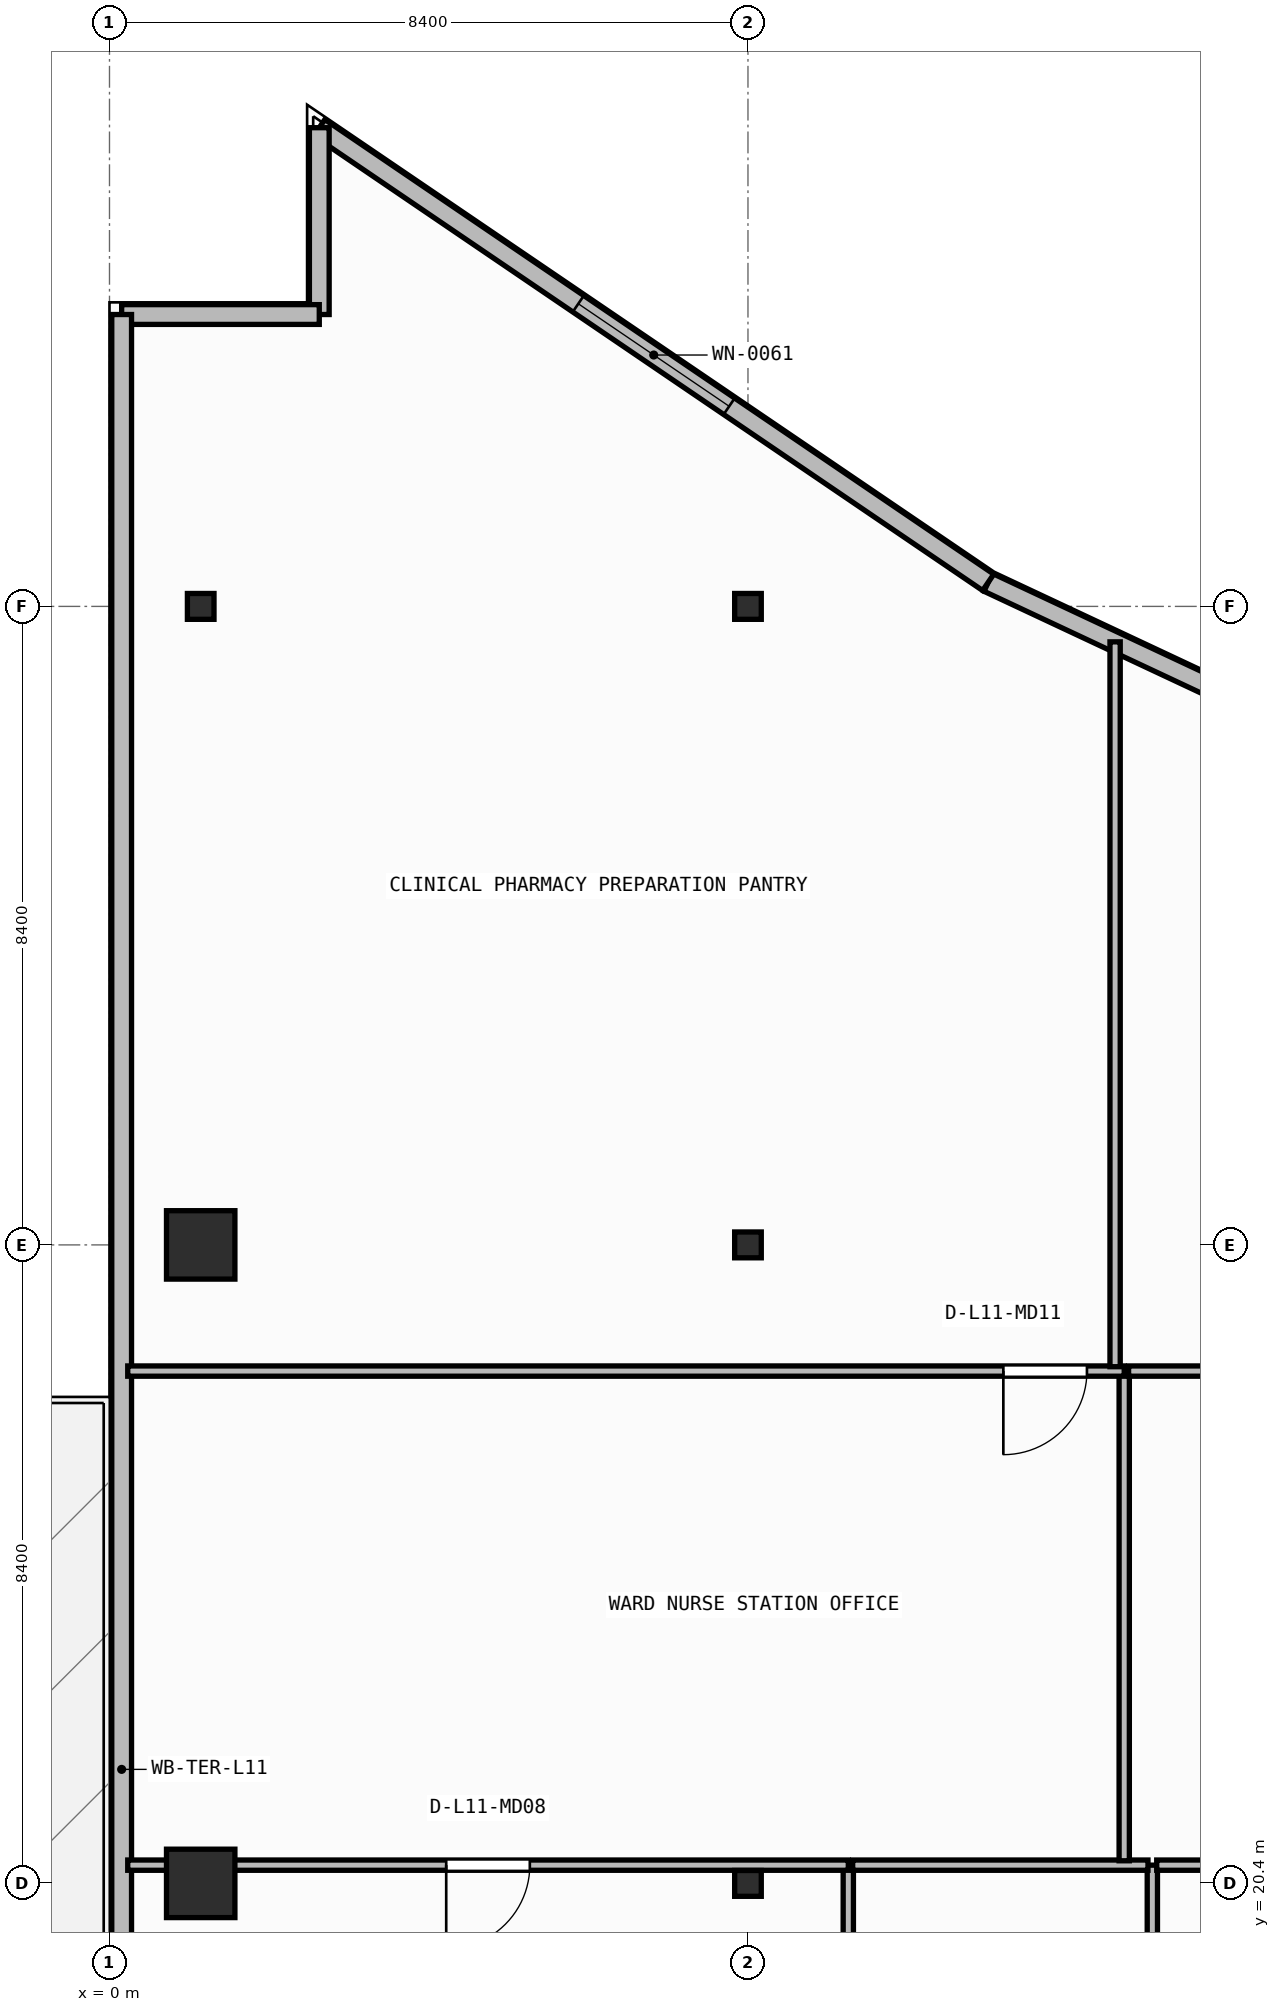
"""IFC4 building model, lengths in metres.
Left out: names, types, materials, properties, quantities, classifications, styles, units other than length and angle.
Written with IfcOpenShell. Run it as: python <this file> out.ifc"""

import sys

from ifc_helpers import new_model, si_unit, direction, frame, frame_2d, origin, origin_2d, place, context, subcontext, project, spatial, rectangle, i_section, extrude, element, fill, save


model = new_model("IFC4")
c1 = context("Model", 3, precision=1e-05, world=origin(), true_north=direction((0.0, 1.0)))
c2 = subcontext(c1, "Body", "Model", "MODEL_VIEW")
j1 = project(units=[si_unit("LENGTHUNIT", "METRE"), si_unit("PLANEANGLEUNIT", "RADIAN")], contexts=[c1])
p1 = place(None, origin())
s1 = spatial("IfcSite", under=j1, at=p1, CompositionType="ELEMENT")
p2 = place(p1, origin())
s2 = spatial("IfcBuilding", under=s1, at=p2, CompositionType="ELEMENT")
p3 = place(p2, frame((0.0, 0.0, 46.2)))
s3 = spatial("IfcBuildingStorey", under=s2, at=p3, CompositionType="ELEMENT", Elevation=46.2)
p4 = place(p3, frame((1.2, 20.4, 0.0), z_axis=(0.0, 0.0, 1.0), x_axis=(1.0, 0.0, 0.0)))
e1 = element("IfcColumn", 1, at=p4, inside=s3, PredefinedType="COLUMN", context=c2, shape_type="SweptSolid", body=[
    extrude(rectangle(XDim=0.9, YDim=0.9, at=origin_2d()), origin(), (0.0, 0.0, 1.0), 3.95),
])
p5 = place(p3, frame((8.4, 20.4, 0.0), z_axis=(0.0, 0.0, 1.0), x_axis=(1.0, 0.0, 0.0)))
e2 = element("IfcColumn", 2, at=p5, inside=s3, PredefinedType="COLUMN", context=c2, shape_type="SweptSolid", body=[
    extrude(i_section(OverallWidth=0.35, OverallDepth=0.34, WebThickness=0.016, FlangeThickness=0.028, at=origin_2d()), origin(), (0.0, 0.0, 1.0), 3.95),
])
p6 = place(p3, frame((1.2, 28.8, 0.0), z_axis=(0.0, 0.0, 1.0), x_axis=(1.0, 0.0, 0.0)))
e3 = element("IfcColumn", 3, at=p6, inside=s3, PredefinedType="COLUMN", context=c2, shape_type="SweptSolid", body=[
    extrude(rectangle(XDim=0.9, YDim=0.9, at=origin_2d()), origin(), (0.0, 0.0, 1.0), 3.95),
])
for number, where, z_axis, x_axis in (
    (4, (8.4, 28.8, 0.0), (0.0, 0.0, 1.0), (1.0, 0.0, 0.0)),
    (5, (1.2, 37.2, 0.0), (0.0, 0.0, 1.0), (1.0, 0.0, 0.0)),
    (6, (8.4, 37.2, 0.0), (0.0, 0.0, 1.0), (1.0, 0.0, 0.0)),
):
    element("IfcColumn", number, at=place(p3, frame(where, z_axis=z_axis, x_axis=x_axis)), inside=s3, PredefinedType="COLUMN", context=c2, shape_type="SweptSolid", body=[
        extrude(i_section(OverallWidth=0.35, OverallDepth=0.34, WebThickness=0.016, FlangeThickness=0.028, at=origin_2d()), origin(), (0.0, 0.0, 1.0), 3.95),
    ])
p7 = place(p3, frame((24.408, 31.492, 0.0), z_axis=(0.0, 0.0, 1.0), x_axis=(-0.905396522918, 0.424566998585, 0.0)))
e7 = element("IfcWall", 7, at=p7, inside=s3, PredefinedType="STANDARD", context=c2, shape_type="SweptSolid", body=[
    extrude(rectangle(XDim=14.189, YDim=0.26, at=frame_2d((7.095, 0.0))), origin(), (0.0, 0.0, 1.0), 3.71),
])
p8 = place(p7, frame((5.895, 0.0, 0.9)))
e8 = element("IfcOpeningElement", 8, at=p8, cuts=e7, PredefinedType="OPENING", context=c2, shape_type="SweptSolid", body=[
    extrude(rectangle(XDim=2.4, YDim=1.65, at=frame_2d((1.2, 0.825))), frame((0.0, 0.14, 0.0), z_axis=(0.0, -1.0, 0.0), x_axis=(1.0, 0.0, 0.0)), (0.0, 0.0, 1.0), 0.28),
])
p9 = place(p3, frame((11.561, 37.517, 0.0), z_axis=(0.0, 0.0, 1.0), x_axis=(-0.827064743936, 0.562106670782, 0.0)))
e9 = element("IfcWall", 9, at=p9, inside=s3, PredefinedType="STANDARD", context=c2, shape_type="SweptSolid", body=[
    extrude(rectangle(XDim=10.641, YDim=0.26, at=frame_2d((5.32, 0.0))), origin(), (0.0, 0.0, 1.0), 3.71),
])
p10 = place(p9, frame((4.12, 0.0, 0.9)))
e10 = element("IfcOpeningElement", 10, at=p10, cuts=e9, PredefinedType="OPENING", context=c2, shape_type="SweptSolid", body=[
    extrude(rectangle(XDim=2.4, YDim=1.65, at=frame_2d((1.2, 0.825))), frame((0.0, 0.14, 0.0), z_axis=(0.0, -1.0, 0.0), x_axis=(1.0, 0.0, 0.0)), (0.0, 0.0, 1.0), 0.28),
])
p11 = place(p3, frame((2.76, 43.498, 0.0), z_axis=(0.0, 0.0, 1.0), x_axis=(0.0, -1.0, 0.0)))
e11 = element("IfcWall", 11, at=p11, inside=s3, PredefinedType="STANDARD", context=c2, shape_type="SweptSolid", body=[
    extrude(rectangle(XDim=2.458, YDim=0.26, at=frame_2d((1.229, 0.0))), origin(), (0.0, 0.0, 1.0), 3.71),
])
p12 = place(p3, frame((2.76, 41.04, 0.0), z_axis=(0.0, 0.0, 1.0), x_axis=(-1.0, 0.0, 0.0)))
e12 = element("IfcWall", 12, at=p12, inside=s3, PredefinedType="STANDARD", context=c2, shape_type="SweptSolid", body=[
    extrude(rectangle(XDim=2.6, YDim=0.26, at=frame_2d((1.3, 0.0))), origin(), (0.0, 0.0, 1.0), 3.71),
])
p13 = place(p3, frame((0.16, 41.04, 0.0), z_axis=(0.0, 0.0, 1.0), x_axis=(0.0, -1.0, 0.0)))
e13 = element("IfcWall", 13, at=p13, inside=s3, PredefinedType="STANDARD", context=c2, shape_type="SweptSolid", body=[
    extrude(rectangle(XDim=38.28, YDim=0.26, at=frame_2d((19.14, 0.0))), origin(), (0.0, 0.0, 1.0), 3.71),
])
p14 = place(p13, frame((22.743, 0.0, 0.0)))
e14 = element("IfcOpeningElement", 14, at=p14, cuts=e13, PredefinedType="OPENING", context=c2, shape_type="SweptSolid", body=[
    extrude(rectangle(XDim=1.3, YDim=2.15, at=frame_2d((0.65, 1.075))), frame((0.0, 0.14, 0.0), z_axis=(0.0, -1.0, 0.0), x_axis=(1.0, 0.0, 0.0)), (0.0, 0.0, 1.0), 0.28),
])
p15 = place(p3, frame((9.72, 14.76, 0.0), z_axis=(0.0, 0.0, 1.0), x_axis=(0.0, 1.0, 0.0)))
e15 = element("IfcWall", 15, at=p15, inside=s3, PredefinedType="PARTITIONING", context=c2, shape_type="SweptSolid", body=[
    extrude(rectangle(XDim=5.88, YDim=0.135, at=frame_2d((2.94, 0.0))), origin(), (0.0, 0.0, 1.0), 3.71),
])
p16 = place(p3, frame((9.72, 20.64, 0.0), z_axis=(0.0, 0.0, 1.0), x_axis=(-1.0, 0.0, 0.0)))
e16 = element("IfcWall", 16, at=p16, inside=s3, PredefinedType="PARTITIONING", context=c2, shape_type="SweptSolid", body=[
    extrude(rectangle(XDim=9.48, YDim=0.135, at=frame_2d((4.74, 0.0))), origin(), (0.0, 0.0, 1.0), 3.073),
])
p17 = place(p16, frame((4.19, 0.0, 0.0)))
e17 = element("IfcOpeningElement", 17, at=p17, cuts=e16, PredefinedType="OPENING", context=c2, shape_type="SweptSolid", body=[
    extrude(rectangle(XDim=1.1, YDim=2.1, at=frame_2d((0.55, 1.05))), frame((0.0, 0.077, 0.0), z_axis=(0.0, -1.0, 0.0), x_axis=(1.0, 0.0, 0.0)), (0.0, 0.0, 1.0), 0.155),
])
p18 = place(p3, frame((13.72, 14.76, 0.0), z_axis=(0.0, 0.0, 1.0), x_axis=(0.0, 1.0, 0.0)))
e18 = element("IfcWall", 18, at=p18, inside=s3, PredefinedType="PARTITIONING", context=c2, shape_type="SweptSolid", body=[
    extrude(rectangle(XDim=5.88, YDim=0.135, at=frame_2d((2.94, 0.0))), origin(), (0.0, 0.0, 1.0), 3.71),
])
p19 = place(p3, frame((13.663, 20.64, 0.0), z_axis=(0.0, 0.0, 1.0), x_axis=(-1.0, 0.0, 0.0)))
e19 = element("IfcWall", 19, at=p19, inside=s3, PredefinedType="PARTITIONING", context=c2, shape_type="SweptSolid", body=[
    extrude(rectangle(XDim=3.885, YDim=0.135, at=frame_2d((1.942, 0.0))), origin(), (0.0, 0.0, 1.0), 3.073),
])
p20 = place(p3, frame((19.84, 20.64, 0.0), z_axis=(0.0, 0.0, 1.0), x_axis=(-1.0, 0.0, 0.0)))
e20 = element("IfcWall", 20, at=p20, inside=s3, PredefinedType="PARTITIONING", context=c2, shape_type="SweptSolid", body=[
    extrude(rectangle(XDim=6.062, YDim=0.135, at=frame_2d((3.031, 0.0))), origin(), (0.0, 0.0, 1.0), 3.073),
])
p21 = place(p3, frame((13.35, 20.698, 0.0), z_axis=(0.0, 0.0, 1.0), x_axis=(0.0, 1.0, 0.0)))
e21 = element("IfcWall", 21, at=p21, inside=s3, PredefinedType="PARTITIONING", context=c2, shape_type="SweptSolid", body=[
    extrude(rectangle(XDim=6.442, YDim=0.135, at=frame_2d((3.221, 0.0))), origin(), (0.0, 0.0, 1.0), 3.71),
])
p22 = place(p3, frame((13.35, 27.14, 0.0), z_axis=(0.0, 0.0, 1.0), x_axis=(-1.0, 0.0, 0.0)))
e22 = element("IfcWall", 22, at=p22, inside=s3, PredefinedType="PARTITIONING", context=c2, shape_type="SweptSolid", body=[
    extrude(rectangle(XDim=13.11, YDim=0.135, at=frame_2d((6.555, 0.0))), origin(), (0.0, 0.0, 1.0), 3.71),
])
p23 = place(p22, frame((0.49, 0.0, 0.0)))
e23 = element("IfcOpeningElement", 23, at=p23, cuts=e22, PredefinedType="OPENING", context=c2, shape_type="SweptSolid", body=[
    extrude(rectangle(XDim=1.1, YDim=2.1, at=frame_2d((0.55, 1.05))), frame((0.0, 0.077, 0.0), z_axis=(0.0, -1.0, 0.0), x_axis=(1.0, 0.0, 0.0)), (0.0, 0.0, 1.0), 0.155),
])
p24 = place(p3, frame((29.248, 27.14, 0.0), z_axis=(0.0, 0.0, 1.0), x_axis=(-1.0, 0.0, 0.0)))
e24 = element("IfcWall", 24, at=p24, inside=s3, PredefinedType="PARTITIONING", context=c2, shape_type="SweptSolid", body=[
    extrude(rectangle(XDim=15.84, YDim=0.135, at=frame_2d((7.92, 0.0))), origin(), (0.0, 0.0, 1.0), 3.71),
])
p25 = place(p24, frame((7.37, 0.0, 0.0)))
e25 = element("IfcOpeningElement", 25, at=p25, cuts=e24, PredefinedType="OPENING", context=c2, shape_type="SweptSolid", body=[
    extrude(rectangle(XDim=1.1, YDim=2.1, at=frame_2d((0.55, 1.05))), frame((0.0, 0.077, 0.0), z_axis=(0.0, -1.0, 0.0), x_axis=(1.0, 0.0, 0.0)), (0.0, 0.0, 1.0), 0.155),
])
p26 = place(p3, frame((13.23, 27.198, 0.0), z_axis=(0.0, 0.0, 1.0), x_axis=(0.0, 1.0, 0.0)))
e26 = element("IfcWall", 26, at=p26, inside=s3, PredefinedType="PARTITIONING", context=c2, shape_type="SweptSolid", body=[
    extrude(rectangle(XDim=9.536, YDim=0.135, at=frame_2d((4.768, 0.0))), origin(), (0.0, 0.0, 1.0), 3.71),
])
p27 = place(p10, origin())
e27 = element("IfcWindow", 27, at=p27, inside=s3, PartitioningType="SINGLE_PANEL", PredefinedType="WINDOW", context=c2, shape_type="SweptSolid", body=[
    extrude(rectangle(XDim=2.4, YDim=1.65, at=frame_2d((1.2, 0.825))), frame((0.0, 0.03, 0.0), z_axis=(0.0, -1.0, 0.0), x_axis=(1.0, 0.0, 0.0)), (0.0, 0.0, 1.0), 0.06),
])
fill(e10, e27)
p28 = place(p17, origin())
e28 = element("IfcDoor", 28, at=p28, inside=s3, OperationType="SINGLE_SWING_RIGHT", PredefinedType="DOOR", context=c2, shape_type="SweptSolid", body=[
    extrude(rectangle(XDim=1.1, YDim=2.1, at=frame_2d((0.55, 1.05))), frame((0.0, 0.025, 0.0), z_axis=(0.0, -1.0, 0.0), x_axis=(1.0, 0.0, 0.0)), (0.0, 0.0, 1.0), 0.05),
])
fill(e17, e28)
p29 = place(p23, origin())
e29 = element("IfcDoor", 29, at=p29, inside=s3, OperationType="SINGLE_SWING_RIGHT", PredefinedType="DOOR", context=c2, shape_type="SweptSolid", body=[
    extrude(rectangle(XDim=1.1, YDim=2.1, at=frame_2d((0.55, 1.05))), frame((0.0, 0.025, 0.0), z_axis=(0.0, -1.0, 0.0), x_axis=(1.0, 0.0, 0.0)), (0.0, 0.0, 1.0), 0.05),
])
fill(e23, e29)
save(model, sys.argv[1])
